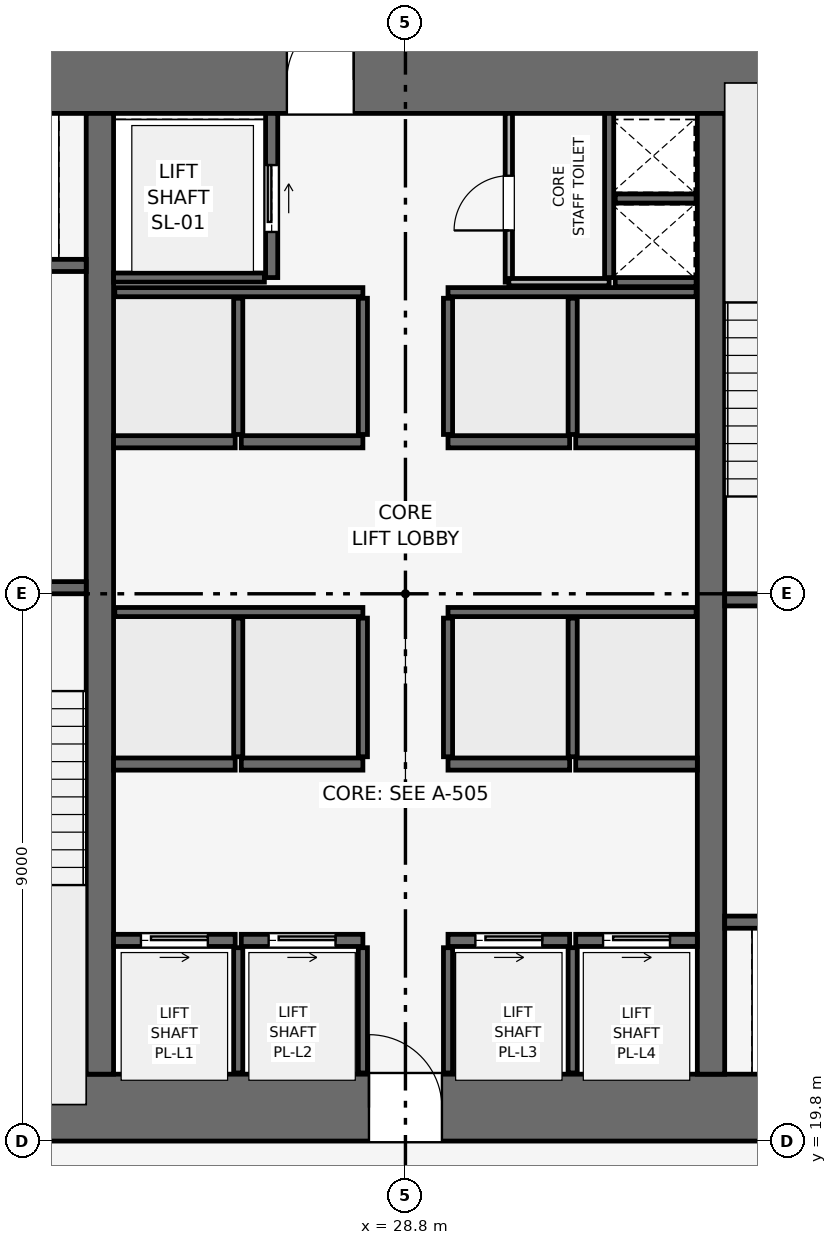
"""IFC4 building model, lengths in metres.
Left out: names, types, materials, properties, quantities, classifications, styles, units other than length and angle.
Written with IfcOpenShell. Run it as: python <this file> out.ifc"""

import sys

from ifc_helpers import new_model, si_unit, direction, frame, frame_2d, origin, place, context, subcontext, project, spatial, rectangle, extrude, element, fill, save


model = new_model("IFC4")
c1 = context("Model", 3, precision=1e-05, world=origin(), true_north=direction((0.0, 1.0)))
c2 = subcontext(c1, "Body", "Model", "MODEL_VIEW")
j1 = project(units=[si_unit("LENGTHUNIT", "METRE"), si_unit("PLANEANGLEUNIT", "RADIAN")], contexts=[c1])
p1 = place(None, origin())
s1 = spatial("IfcSite", under=j1, at=p1, CompositionType="ELEMENT")
p2 = place(p1, origin())
s2 = spatial("IfcBuilding", under=s1, at=p2, CompositionType="ELEMENT")
p3 = place(p2, frame((0.0, 0.0, 76.8)))
s3 = spatial("IfcBuildingStorey", under=s2, at=p3, CompositionType="ELEMENT", Elevation=76.8)
p4 = place(p3, frame((19.8, 20.35, 0.0), z_axis=(0.0, 0.0, 1.0), x_axis=(1.0, 0.0, 0.0)))
e1 = element("IfcWall", 1, at=p4, inside=s3, PredefinedType="SHEAR", context=c2, shape_type="SweptSolid", body=[
    extrude(rectangle(XDim=18.0, YDim=1.1, at=frame_2d((9.0, 0.0))), origin(), (0.0, 0.0, 1.0), 3.9),
])
p5 = place(p4, frame((8.4, 0.0, 0.0)))
e2 = element("IfcOpeningElement", 2, at=p5, cuts=e1, PredefinedType="OPENING", context=c2, shape_type="SweptSolid", body=[
    extrude(rectangle(XDim=1.2, YDim=2.2, at=frame_2d((0.6, 1.1))), frame((0.0, 0.56, 0.0), z_axis=(0.0, -1.0, 0.0), x_axis=(1.0, 0.0, 0.0)), (0.0, 0.0, 1.0), 1.12),
])
p6 = place(p3, frame((19.8, 37.25, 0.0), z_axis=(0.0, 0.0, 1.0), x_axis=(1.0, 0.0, 0.0)))
e3 = element("IfcWall", 3, at=p6, inside=s3, PredefinedType="SHEAR", context=c2, shape_type="SweptSolid", body=[
    extrude(rectangle(XDim=18.0, YDim=1.1, at=frame_2d((9.0, 0.0))), origin(), (0.0, 0.0, 1.0), 3.9),
])
p7 = place(p6, frame((7.05, 0.0, 0.0)))
e4 = element("IfcOpeningElement", 4, at=p7, cuts=e3, PredefinedType="OPENING", context=c2, shape_type="SweptSolid", body=[
    extrude(rectangle(XDim=1.1, YDim=2.15, at=frame_2d((0.55, 1.075))), frame((0.0, 0.56, 0.0), z_axis=(0.0, -1.0, 0.0), x_axis=(1.0, 0.0, 0.0)), (0.0, 0.0, 1.0), 1.12),
])
for number, where, z_axis, x_axis in (
    (5, (23.775, 20.9, 0.0), (0.0, 0.0, 1.0), (0.0, 1.0, 0.0)),
    (6, (33.825, 20.9, 0.0), (0.0, 0.0, 1.0), (0.0, 1.0, 0.0)),
):
    element("IfcWall", number, at=place(p3, frame(where, z_axis=z_axis, x_axis=x_axis)), inside=s3, PredefinedType="SHEAR", context=c2, shape_type="SweptSolid", body=[
        extrude(rectangle(XDim=15.8, YDim=0.45, at=frame_2d((7.9, 0.0))), origin(), (0.0, 0.0, 1.0), 3.9),
    ])
p8 = place(p3, frame((20.4, 28.9, 0.0), z_axis=(0.0, 0.0, 1.0), x_axis=(1.0, 0.0, 0.0)))
e7 = element("IfcWall", 7, at=p8, inside=s3, PredefinedType="SHEAR", context=c2, shape_type="SweptSolid", body=[
    extrude(rectangle(XDim=3.15, YDim=0.2, at=frame_2d((1.575, 0.0))), origin(), (0.0, 0.0, 1.0), 3.65),
])
p9 = place(p8, frame((0.8, 0.0, 0.0)))
e8 = element("IfcOpeningElement", 8, at=p9, cuts=e7, PredefinedType="OPENING", context=c2, shape_type="SweptSolid", body=[
    extrude(rectangle(XDim=1.0, YDim=2.1, at=frame_2d((0.5, 1.05))), frame((0.0, 0.11, 0.0), z_axis=(0.0, -1.0, 0.0), x_axis=(1.0, 0.0, 0.0)), (0.0, 0.0, 1.0), 0.22),
])
p10 = place(p3, frame((34.05, 28.7, 0.0), z_axis=(0.0, 0.0, 1.0), x_axis=(1.0, 0.0, 0.0)))
e9 = element("IfcWall", 9, at=p10, inside=s3, PredefinedType="SHEAR", context=c2, shape_type="SweptSolid", body=[
    extrude(rectangle(XDim=3.15, YDim=0.2, at=frame_2d((1.575, 0.0))), origin(), (0.0, 0.0, 1.0), 3.65),
])
p11 = place(p10, frame((0.8, 0.0, 0.0)))
e10 = element("IfcOpeningElement", 10, at=p11, cuts=e9, PredefinedType="OPENING", context=c2, shape_type="SweptSolid", body=[
    extrude(rectangle(XDim=1.0, YDim=2.1, at=frame_2d((0.5, 1.05))), frame((0.0, 0.11, 0.0), z_axis=(0.0, -1.0, 0.0), x_axis=(1.0, 0.0, 0.0)), (0.0, 0.0, 1.0), 0.22),
])
p12 = place(p3, frame((32.15, 34.0, 0.0), z_axis=(0.0, 0.0, 1.0), x_axis=(0.0, 1.0, 0.0)))
e11 = element("IfcWall", 11, at=p12, inside=s3, PredefinedType="SHEAR", context=c2, shape_type="SweptSolid", body=[
    extrude(rectangle(XDim=2.7, YDim=0.15, at=frame_2d((1.35, 0.0))), origin(), (0.0, 0.0, 1.0), 3.65),
])
for number, where, z_axis, x_axis in (
    (12, (32.25, 33.925, 0.0), (0.0, 0.0, 1.0), (1.0, 0.0, 0.0)),
    (13, (32.25, 35.3, 0.0), (0.0, 0.0, 1.0), (1.0, 0.0, 0.0)),
):
    element("IfcWall", number, at=place(p3, frame(where, z_axis=z_axis, x_axis=x_axis)), inside=s3, PredefinedType="SHEAR", context=c2, shape_type="SweptSolid", body=[
        extrude(rectangle(XDim=1.33, YDim=0.15, at=frame_2d((0.665, 0.0))), origin(), (0.0, 0.0, 1.0), 3.65),
    ])
p13 = place(p3, frame((20.5, 34.2, 0.0), z_axis=(0.0, 0.0, 1.0), x_axis=(1.0, 0.0, 0.0)))
e14 = element("IfcWall", 14, at=p13, inside=s3, PredefinedType="SHEAR", context=c2, shape_type="SweptSolid", body=[
    extrude(rectangle(XDim=3.05, YDim=0.2, at=frame_2d((1.525, 0.0))), origin(), (0.0, 0.0, 1.0), 3.65),
])
p14 = place(p13, frame((0.75, 0.0, 0.0)))
e15 = element("IfcOpeningElement", 15, at=p14, cuts=e14, PredefinedType="OPENING", context=c2, shape_type="SweptSolid", body=[
    extrude(rectangle(XDim=1.1, YDim=2.15, at=frame_2d((0.55, 1.075))), frame((0.0, 0.11, 0.0), z_axis=(0.0, -1.0, 0.0), x_axis=(1.0, 0.0, 0.0)), (0.0, 0.0, 1.0), 0.22),
])
p15 = place(p3, frame((34.05, 23.4, 0.0), z_axis=(0.0, 0.0, 1.0), x_axis=(1.0, 0.0, 0.0)))
e16 = element("IfcWall", 16, at=p15, inside=s3, PredefinedType="SHEAR", context=c2, shape_type="SweptSolid", body=[
    extrude(rectangle(XDim=3.05, YDim=0.2, at=frame_2d((1.525, 0.0))), origin(), (0.0, 0.0, 1.0), 3.65),
])
p16 = place(p15, frame((1.2, 0.0, 0.0)))
e17 = element("IfcOpeningElement", 17, at=p16, cuts=e16, PredefinedType="OPENING", context=c2, shape_type="SweptSolid", body=[
    extrude(rectangle(XDim=1.1, YDim=2.15, at=frame_2d((0.55, 1.075))), frame((0.0, 0.11, 0.0), z_axis=(0.0, -1.0, 0.0), x_axis=(1.0, 0.0, 0.0)), (0.0, 0.0, 1.0), 0.22),
])
p17 = place(p3, frame((26.6, 34.0, 0.0), z_axis=(0.0, 0.0, 1.0), x_axis=(0.0, 1.0, 0.0)))
e18 = element("IfcWall", 18, at=p17, inside=s3, PredefinedType="SHEAR", context=c2, shape_type="SweptSolid", body=[
    extrude(rectangle(XDim=2.7, YDim=0.2, at=frame_2d((1.35, 0.0))), origin(), (0.0, 0.0, 1.0), 3.65),
])
p18 = place(p17, frame((0.75, 0.0, 0.0)))
e19 = element("IfcOpeningElement", 19, at=p18, cuts=e18, PredefinedType="OPENING", context=c2, shape_type="SweptSolid", body=[
    extrude(rectangle(XDim=1.1, YDim=2.15, at=frame_2d((0.55, 1.075))), frame((0.0, 0.11, 0.0), z_axis=(0.0, -1.0, 0.0), x_axis=(1.0, 0.0, 0.0)), (0.0, 0.0, 1.0), 0.22),
])
p19 = place(p3, frame((24.0, 34.0, 0.0), z_axis=(0.0, 0.0, 1.0), x_axis=(1.0, 0.0, 0.0)))
e20 = element("IfcWall", 20, at=p19, inside=s3, PredefinedType="SHEAR", context=c2, shape_type="SweptSolid", body=[
    extrude(rectangle(XDim=2.48, YDim=0.15, at=frame_2d((1.24, 0.0))), origin(), (0.0, 0.0, 1.0), 3.65),
])
p20 = place(p3, frame((24.0, 23.1, 0.0), z_axis=(0.0, 0.0, 1.0), x_axis=(1.0, 0.0, 0.0)))
e21 = element("IfcWall", 21, at=p20, inside=s3, PredefinedType="SHEAR", context=c2, shape_type="SweptSolid", body=[
    extrude(rectangle(XDim=2.0, YDim=0.2, at=frame_2d((1.0, 0.0))), origin(), (0.0, 0.0, 1.0), 3.65),
])
p21 = place(p20, frame((0.45, 0.0, 0.0)))
e22 = element("IfcOpeningElement", 22, at=p21, cuts=e21, PredefinedType="OPENING", context=c2, shape_type="SweptSolid", body=[
    extrude(rectangle(XDim=1.1, YDim=2.15, at=frame_2d((0.55, 1.075))), frame((0.0, 0.11, 0.0), z_axis=(0.0, -1.0, 0.0), x_axis=(1.0, 0.0, 0.0)), (0.0, 0.0, 1.0), 0.22),
])
p22 = place(p3, frame((26.1, 23.1, 0.0), z_axis=(0.0, 0.0, 1.0), x_axis=(1.0, 0.0, 0.0)))
e23 = element("IfcWall", 23, at=p22, inside=s3, PredefinedType="SHEAR", context=c2, shape_type="SweptSolid", body=[
    extrude(rectangle(XDim=2.0, YDim=0.2, at=frame_2d((1.0, 0.0))), origin(), (0.0, 0.0, 1.0), 3.65),
])
p23 = place(p22, frame((0.45, 0.0, 0.0)))
e24 = element("IfcOpeningElement", 24, at=p23, cuts=e23, PredefinedType="OPENING", context=c2, shape_type="SweptSolid", body=[
    extrude(rectangle(XDim=1.1, YDim=2.15, at=frame_2d((0.55, 1.075))), frame((0.0, 0.11, 0.0), z_axis=(0.0, -1.0, 0.0), x_axis=(1.0, 0.0, 0.0)), (0.0, 0.0, 1.0), 0.22),
])
p24 = place(p3, frame((29.5, 23.1, 0.0), z_axis=(0.0, 0.0, 1.0), x_axis=(1.0, 0.0, 0.0)))
e25 = element("IfcWall", 25, at=p24, inside=s3, PredefinedType="SHEAR", context=c2, shape_type="SweptSolid", body=[
    extrude(rectangle(XDim=2.0, YDim=0.2, at=frame_2d((1.0, 0.0))), origin(), (0.0, 0.0, 1.0), 3.65),
])
p25 = place(p24, frame((0.45, 0.0, 0.0)))
e26 = element("IfcOpeningElement", 26, at=p25, cuts=e25, PredefinedType="OPENING", context=c2, shape_type="SweptSolid", body=[
    extrude(rectangle(XDim=1.1, YDim=2.15, at=frame_2d((0.55, 1.075))), frame((0.0, 0.11, 0.0), z_axis=(0.0, -1.0, 0.0), x_axis=(1.0, 0.0, 0.0)), (0.0, 0.0, 1.0), 0.22),
])
p26 = place(p3, frame((31.6, 23.1, 0.0), z_axis=(0.0, 0.0, 1.0), x_axis=(1.0, 0.0, 0.0)))
e27 = element("IfcWall", 27, at=p26, inside=s3, PredefinedType="SHEAR", context=c2, shape_type="SweptSolid", body=[
    extrude(rectangle(XDim=2.0, YDim=0.2, at=frame_2d((1.0, 0.0))), origin(), (0.0, 0.0, 1.0), 3.65),
])
p27 = place(p26, frame((0.45, 0.0, 0.0)))
e28 = element("IfcOpeningElement", 28, at=p27, cuts=e27, PredefinedType="OPENING", context=c2, shape_type="SweptSolid", body=[
    extrude(rectangle(XDim=1.1, YDim=2.15, at=frame_2d((0.55, 1.075))), frame((0.0, 0.11, 0.0), z_axis=(0.0, -1.0, 0.0), x_axis=(1.0, 0.0, 0.0)), (0.0, 0.0, 1.0), 0.22),
])
for number, where, z_axis, x_axis in (
    (29, (24.0, 26.0, 0.0), (0.0, 0.0, 1.0), (1.0, 0.0, 0.0)),
    (30, (26.1, 26.0, 0.0), (0.0, 0.0, 1.0), (1.0, 0.0, 0.0)),
    (31, (29.5, 26.0, 0.0), (0.0, 0.0, 1.0), (1.0, 0.0, 0.0)),
    (32, (31.6, 26.0, 0.0), (0.0, 0.0, 1.0), (1.0, 0.0, 0.0)),
    (33, (24.0, 31.3, 0.0), (0.0, 0.0, 1.0), (1.0, 0.0, 0.0)),
    (34, (26.1, 31.3, 0.0), (0.0, 0.0, 1.0), (1.0, 0.0, 0.0)),
    (35, (29.5, 31.3, 0.0), (0.0, 0.0, 1.0), (1.0, 0.0, 0.0)),
    (36, (31.6, 31.3, 0.0), (0.0, 0.0, 1.0), (1.0, 0.0, 0.0)),
):
    element("IfcWall", number, at=place(p3, frame(where, z_axis=z_axis, x_axis=x_axis)), inside=s3, PredefinedType="SHEAR", context=c2, shape_type="SweptSolid", body=[
        extrude(rectangle(XDim=2.0, YDim=0.2, at=frame_2d((1.0, 0.0))), origin(), (0.0, 0.0, 1.0), 3.65),
    ])
for number, where, z_axis, x_axis in (
    (37, (26.05, 20.92, 0.0), (0.0, 0.0, 1.0), (0.0, 1.0, 0.0)),
    (38, (28.1, 20.92, 0.0), (0.0, 0.0, 1.0), (0.0, 1.0, 0.0)),
    (39, (29.5, 20.92, 0.0), (0.0, 0.0, 1.0), (0.0, 1.0, 0.0)),
    (40, (31.55, 20.92, 0.0), (0.0, 0.0, 1.0), (0.0, 1.0, 0.0)),
):
    element("IfcWall", number, at=place(p3, frame(where, z_axis=z_axis, x_axis=x_axis)), inside=s3, PredefinedType="SHEAR", context=c2, shape_type="SweptSolid", body=[
        extrude(rectangle(XDim=2.06, YDim=0.15, at=frame_2d((1.03, 0.0))), origin(), (0.0, 0.0, 1.0), 3.65),
    ])
for number, where, z_axis, x_axis in (
    (41, (24.02, 28.5, 0.0), (0.0, 0.0, 1.0), (1.0, 0.0, 0.0)),
    (42, (29.5, 28.5, 0.0), (0.0, 0.0, 1.0), (1.0, 0.0, 0.0)),
):
    element("IfcWall", number, at=place(p3, frame(where, z_axis=z_axis, x_axis=x_axis)), inside=s3, PredefinedType="SHEAR", context=c2, shape_type="SweptSolid", body=[
        extrude(rectangle(XDim=4.08, YDim=0.15, at=frame_2d((2.04, 0.0))), origin(), (0.0, 0.0, 1.0), 3.65),
    ])
for number, where, z_axis, x_axis in (
    (43, (26.05, 26.12, 0.0), (0.0, 0.0, 1.0), (0.0, 1.0, 0.0)),
    (44, (28.1, 26.12, 0.0), (0.0, 0.0, 1.0), (0.0, 1.0, 0.0)),
    (45, (29.5, 26.12, 0.0), (0.0, 0.0, 1.0), (0.0, 1.0, 0.0)),
    (46, (31.55, 26.12, 0.0), (0.0, 0.0, 1.0), (0.0, 1.0, 0.0)),
):
    element("IfcWall", number, at=place(p3, frame(where, z_axis=z_axis, x_axis=x_axis)), inside=s3, PredefinedType="SHEAR", context=c2, shape_type="SweptSolid", body=[
        extrude(rectangle(XDim=2.28, YDim=0.15, at=frame_2d((1.14, 0.0))), origin(), (0.0, 0.0, 1.0), 3.65),
    ])
for number, where, z_axis, x_axis in (
    (47, (24.02, 33.76, 0.0), (0.0, 0.0, 1.0), (1.0, 0.0, 0.0)),
    (48, (29.5, 33.76, 0.0), (0.0, 0.0, 1.0), (1.0, 0.0, 0.0)),
):
    element("IfcWall", number, at=place(p3, frame(where, z_axis=z_axis, x_axis=x_axis)), inside=s3, PredefinedType="SHEAR", context=c2, shape_type="SweptSolid", body=[
        extrude(rectangle(XDim=4.08, YDim=0.15, at=frame_2d((2.04, 0.0))), origin(), (0.0, 0.0, 1.0), 3.65),
    ])
for number, where, z_axis, x_axis in (
    (49, (26.05, 31.42, 0.0), (0.0, 0.0, 1.0), (0.0, 1.0, 0.0)),
    (50, (28.1, 31.42, 0.0), (0.0, 0.0, 1.0), (0.0, 1.0, 0.0)),
    (51, (29.5, 31.42, 0.0), (0.0, 0.0, 1.0), (0.0, 1.0, 0.0)),
    (52, (31.55, 31.42, 0.0), (0.0, 0.0, 1.0), (0.0, 1.0, 0.0)),
):
    element("IfcWall", number, at=place(p3, frame(where, z_axis=z_axis, x_axis=x_axis)), inside=s3, PredefinedType="SHEAR", context=c2, shape_type="SweptSolid", body=[
        extrude(rectangle(XDim=2.24, YDim=0.15, at=frame_2d((1.12, 0.0))), origin(), (0.0, 0.0, 1.0), 3.65),
    ])
p28 = place(p3, frame((30.5, 33.925, 0.0), z_axis=(0.0, 0.0, 1.0), x_axis=(0.0, 1.0, 0.0)))
e53 = element("IfcWall", 53, at=p28, inside=s3, PredefinedType="PARTITIONING", context=c2, shape_type="SweptSolid", body=[
    extrude(rectangle(XDim=2.775, YDim=0.12, at=frame_2d((1.387, 0.0))), origin(), (0.0, 0.0, 1.0), 3.65),
])
p29 = place(p28, frame((0.85, 0.0, 0.0)))
e54 = element("IfcOpeningElement", 54, at=p29, cuts=e53, PredefinedType="OPENING", context=c2, shape_type="SweptSolid", body=[
    extrude(rectangle(XDim=0.9, YDim=2.1, at=frame_2d((0.45, 1.05))), frame((0.0, 0.07, 0.0), z_axis=(0.0, -1.0, 0.0), x_axis=(1.0, 0.0, 0.0)), (0.0, 0.0, 1.0), 0.14),
])
p30 = place(p3, frame((30.5, 33.925, 0.0), z_axis=(0.0, 0.0, 1.0), x_axis=(1.0, 0.0, 0.0)))
e55 = element("IfcWall", 55, at=p30, inside=s3, PredefinedType="PARTITIONING", context=c2, shape_type="SweptSolid", body=[
    extrude(rectangle(XDim=1.65, YDim=0.12, at=frame_2d((0.825, 0.0))), origin(), (0.0, 0.0, 1.0), 3.65),
])
p31 = place(p18, origin())
e56 = element("IfcDoor", 56, at=p31, inside=s3, OperationType="SLIDING_TO_RIGHT", PredefinedType="DOOR", context=c2, shape_type="SweptSolid", body=[
    extrude(rectangle(XDim=1.1, YDim=2.15, at=frame_2d((0.55, 1.075))), frame((0.0, 0.025, 0.0), z_axis=(0.0, -1.0, 0.0), x_axis=(1.0, 0.0, 0.0)), (0.0, 0.0, 1.0), 0.05),
])
fill(e19, e56)
p32 = place(p21, origin())
e57 = element("IfcDoor", 57, at=p32, inside=s3, OperationType="SLIDING_TO_RIGHT", PredefinedType="DOOR", context=c2, shape_type="SweptSolid", body=[
    extrude(rectangle(XDim=1.1, YDim=2.15, at=frame_2d((0.55, 1.075))), frame((0.0, 0.025, 0.0), z_axis=(0.0, -1.0, 0.0), x_axis=(1.0, 0.0, 0.0)), (0.0, 0.0, 1.0), 0.05),
])
fill(e22, e57)
p33 = place(p23, origin())
e58 = element("IfcDoor", 58, at=p33, inside=s3, OperationType="SLIDING_TO_RIGHT", PredefinedType="DOOR", context=c2, shape_type="SweptSolid", body=[
    extrude(rectangle(XDim=1.1, YDim=2.15, at=frame_2d((0.55, 1.075))), frame((0.0, 0.025, 0.0), z_axis=(0.0, -1.0, 0.0), x_axis=(1.0, 0.0, 0.0)), (0.0, 0.0, 1.0), 0.05),
])
fill(e24, e58)
p34 = place(p25, origin())
e59 = element("IfcDoor", 59, at=p34, inside=s3, OperationType="SLIDING_TO_RIGHT", PredefinedType="DOOR", context=c2, shape_type="SweptSolid", body=[
    extrude(rectangle(XDim=1.1, YDim=2.15, at=frame_2d((0.55, 1.075))), frame((0.0, 0.025, 0.0), z_axis=(0.0, -1.0, 0.0), x_axis=(1.0, 0.0, 0.0)), (0.0, 0.0, 1.0), 0.05),
])
fill(e26, e59)
p35 = place(p27, origin())
e60 = element("IfcDoor", 60, at=p35, inside=s3, OperationType="SLIDING_TO_RIGHT", PredefinedType="DOOR", context=c2, shape_type="SweptSolid", body=[
    extrude(rectangle(XDim=1.1, YDim=2.15, at=frame_2d((0.55, 1.075))), frame((0.0, 0.025, 0.0), z_axis=(0.0, -1.0, 0.0), x_axis=(1.0, 0.0, 0.0)), (0.0, 0.0, 1.0), 0.05),
])
fill(e28, e60)
p36 = place(p29, origin())
e61 = element("IfcDoor", 61, at=p36, inside=s3, OperationType="SINGLE_SWING_LEFT", PredefinedType="DOOR", context=c2, shape_type="SweptSolid", body=[
    extrude(rectangle(XDim=0.9, YDim=2.1, at=frame_2d((0.45, 1.05))), frame((0.0, 0.025, 0.0), z_axis=(0.0, -1.0, 0.0), x_axis=(1.0, 0.0, 0.0)), (0.0, 0.0, 1.0), 0.05),
])
fill(e54, e61)
p37 = place(p5, origin())
e62 = element("IfcDoor", 62, at=p37, inside=s3, OperationType="SINGLE_SWING_LEFT", PredefinedType="DOOR", context=c2, shape_type="SweptSolid", body=[
    extrude(rectangle(XDim=1.2, YDim=2.2, at=frame_2d((0.6, 1.1))), frame((0.0, 0.025, 0.0), z_axis=(0.0, -1.0, 0.0), x_axis=(1.0, 0.0, 0.0)), (0.0, 0.0, 1.0), 0.05),
])
fill(e2, e62)
p38 = place(p7, origin())
e63 = element("IfcDoor", 63, at=p38, inside=s3, OperationType="SINGLE_SWING_RIGHT", PredefinedType="DOOR", context=c2, shape_type="SweptSolid", body=[
    extrude(rectangle(XDim=1.1, YDim=2.15, at=frame_2d((0.55, 1.075))), frame((0.0, 0.025, 0.0), z_axis=(0.0, -1.0, 0.0), x_axis=(1.0, 0.0, 0.0)), (0.0, 0.0, 1.0), 0.05),
])
fill(e4, e63)
save(model, sys.argv[1])
